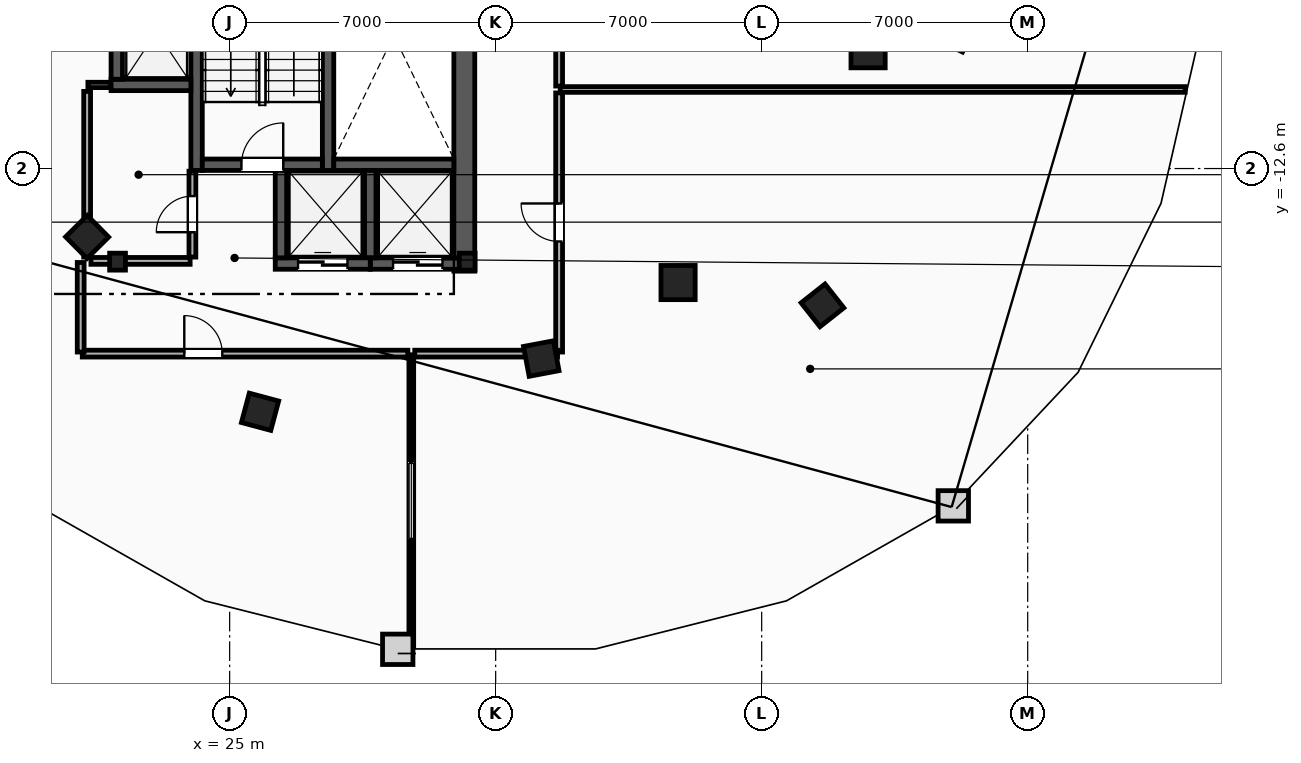
"""IFC4 building model, lengths in metres.
Left out: names, types, materials, properties, quantities, classifications, styles, units other than length and angle.
Written with IfcOpenShell. Run it as: python <this file> out.ifc"""

import sys

from ifc_helpers import new_model, si_unit, direction, frame, frame_2d, origin, origin_2d, place, context, subcontext, project, spatial, rectangle, i_section, extrude, element, fill, save


model = new_model("IFC4")
c1 = context("Model", 3, precision=1e-05, world=origin(), true_north=direction((0.0, 1.0)))
c2 = subcontext(c1, "Body", "Model", "MODEL_VIEW")
j1 = project(units=[si_unit("LENGTHUNIT", "METRE"), si_unit("PLANEANGLEUNIT", "RADIAN")], contexts=[c1])
p1 = place(None, origin())
s1 = spatial("IfcSite", under=j1, at=p1, CompositionType="ELEMENT")
p2 = place(p1, origin())
s2 = spatial("IfcBuilding", under=s1, at=p2, CompositionType="ELEMENT")
p3 = place(p2, frame((0.0, 0.0, 257.6)))
s3 = spatial("IfcBuildingStorey", under=s2, at=p3, CompositionType="ELEMENT", Elevation=257.6)
for number, where, z_axis, x_axis in (
    (1, (22.05, -15.05, 0.0), (0.0, 0.0, 1.0), (1.0, 0.0, 0.0)),
    (2, (31.25, -15.05, 0.0), (0.0, 0.0, 1.0), (1.0, 0.0, 0.0)),
):
    element("IfcColumn", number, at=place(p3, frame(where, z_axis=z_axis, x_axis=x_axis)), inside=s3, PredefinedType="COLUMN", context=c2, shape_type="SweptSolid", body=[
        extrude(i_section(OverallWidth=0.416, OverallDepth=0.446, WebThickness=0.039, FlangeThickness=0.063, FilletRadius=0.018, at=origin_2d()), origin(), (0.0, 0.0, 1.0), 3.6),
    ])
for number, where, z_axis, x_axis in (
    (3, (41.8, -9.5, 0.0), (0.0, 0.0, 1.0), (1.0, 0.0, 0.0)),
    (4, (36.8, -15.6, 0.0), (0.0, 0.0, 1.0), (1.0, 0.0, 0.0)),
):
    element("IfcColumn", number, at=place(p3, frame(where, z_axis=z_axis, x_axis=x_axis)), inside=s3, PredefinedType="COLUMN", context=c2, shape_type="SweptSolid", body=[
        extrude(rectangle(XDim=0.9, YDim=0.9, at=origin_2d()), origin(), (0.0, 0.0, 1.0), 3.6),
    ])
for number, where, z_axis, x_axis in (
    (5, (21.25, -14.4, 0.0), (0.0, 0.0, 1.0), (0.703, -0.711, 0.0)),
    (6, (25.8, -19.0, 0.0), (0.0, 0.0, 1.0), (0.966, -0.259, 0.0)),
    (7, (33.2, -17.6, 0.0), (0.0, 0.0, 1.0), (0.983, 0.186, 0.0)),
    (8, (40.6, -16.2, 0.0), (0.0, 0.0, 1.0), (0.785, 0.619, 0.0)),
):
    element("IfcColumn", number, at=place(p3, frame(where, z_axis=z_axis, x_axis=x_axis)), inside=s3, PredefinedType="COLUMN", context=c2, shape_type="SweptSolid", body=[
        extrude(rectangle(XDim=0.8, YDim=0.8, at=origin_2d()), origin(), (0.0, 0.0, 1.0), 3.6),
    ])
p4 = place(p3, frame((31.175, -15.3, 0.0), z_axis=(0.0, 0.0, 1.0), x_axis=(0.0, 1.0, 0.0)))
e9 = element("IfcWall", 9, at=p4, inside=s3, PredefinedType="SHEAR", context=c2, shape_type="SweptSolid", body=[
    extrude(rectangle(XDim=13.33, YDim=0.55, at=frame_2d((6.665, 0.0))), origin(), (0.0, 0.0, 1.0), 3.34),
])
for number, where, z_axis, x_axis in (
    (10, (27.59, -12.65, 0.0), (0.0, 0.0, 1.0), (0.0, 1.0, 0.0)),
    (11, (24.13, -12.65, 0.0), (0.0, 0.0, 1.0), (0.0, 1.0, 0.0)),
):
    element("IfcWall", number, at=place(p3, frame(where, z_axis=z_axis, x_axis=x_axis)), inside=s3, PredefinedType="SHEAR", context=c2, shape_type="SweptSolid", body=[
        extrude(rectangle(XDim=10.68, YDim=0.3, at=frame_2d((5.34, 0.0))), origin(), (0.0, 0.0, 1.0), 3.34),
    ])
p5 = place(p3, frame((27.74, -12.5, 0.0), z_axis=(0.0, 0.0, 1.0), x_axis=(1.0, 0.0, 0.0)))
e12 = element("IfcWall", 12, at=p5, inside=s3, PredefinedType="SHEAR", context=c2, shape_type="SweptSolid", body=[
    extrude(rectangle(XDim=3.16, YDim=0.3, at=frame_2d((1.58, 0.0))), origin(), (0.0, 0.0, 1.0), 3.34),
])
p6 = place(p3, frame((24.28, -12.5, 0.0), z_axis=(0.0, 0.0, 1.0), x_axis=(1.0, 0.0, 0.0)))
e13 = element("IfcWall", 13, at=p6, inside=s3, PredefinedType="SHEAR", context=c2, shape_type="SweptSolid", body=[
    extrude(rectangle(XDim=3.16, YDim=0.3, at=frame_2d((1.58, 0.0))), origin(), (0.0, 0.0, 1.0), 3.34),
])
p7 = place(p6, frame((1.03, 0.0, 0.0)))
e14 = element("IfcOpeningElement", 14, at=p7, cuts=e13, PredefinedType="OPENING", context=c2, shape_type="SweptSolid", body=[
    extrude(rectangle(XDim=1.1, YDim=2.15, at=frame_2d((0.55, 1.075))), frame((0.0, 0.16, 0.0), z_axis=(0.0, -1.0, 0.0), x_axis=(1.0, 0.0, 0.0)), (0.0, 0.0, 1.0), 0.32),
])
p8 = place(p3, frame((21.88, -10.4, 0.0), z_axis=(0.0, 0.0, 1.0), x_axis=(1.0, 0.0, 0.0)))
e15 = element("IfcWall", 15, at=p8, inside=s3, PredefinedType="SHEAR", context=c2, shape_type="SweptSolid", body=[
    extrude(rectangle(XDim=2.1, YDim=0.3, at=frame_2d((1.05, 0.0))), origin(), (0.0, 0.0, 1.0), 3.34),
])
p9 = place(p3, frame((22.03, -10.25, 0.0), z_axis=(0.0, 0.0, 1.0), x_axis=(0.0, 1.0, 0.0)))
e16 = element("IfcWall", 16, at=p9, inside=s3, PredefinedType="SHEAR", context=c2, shape_type="SweptSolid", body=[
    extrude(rectangle(XDim=2.5, YDim=0.3, at=frame_2d((1.25, 0.0))), origin(), (0.0, 0.0, 1.0), 3.34),
])
p10 = place(p3, frame((28.7, -15.1, 0.0), z_axis=(0.0, 0.0, 1.0), x_axis=(1.0, 0.0, 0.0)))
e17 = element("IfcWall", 17, at=p10, inside=s3, PredefinedType="SHEAR", context=c2, shape_type="SweptSolid", body=[
    extrude(rectangle(XDim=2.5, YDim=0.3, at=frame_2d((1.25, 0.0))), origin(), (0.0, 0.0, 1.0), 3.34),
])
p11 = place(p10, frame((0.6, 0.0, 0.0)))
e18 = element("IfcOpeningElement", 18, at=p11, cuts=e17, PredefinedType="OPENING", context=c2, shape_type="SweptSolid", body=[
    extrude(rectangle(XDim=1.3, YDim=2.2, at=frame_2d((0.65, 1.1))), frame((0.0, 0.16, 0.0), z_axis=(0.0, -1.0, 0.0), x_axis=(1.0, 0.0, 0.0)), (0.0, 0.0, 1.0), 0.32),
])
p12 = place(p3, frame((28.7, -14.95, 0.0), z_axis=(0.0, 0.0, 1.0), x_axis=(0.0, 1.0, 0.0)))
e19 = element("IfcWall", 19, at=p12, inside=s3, PredefinedType="SHEAR", context=c2, shape_type="SweptSolid", body=[
    extrude(rectangle(XDim=2.3, YDim=0.3, at=frame_2d((1.15, 0.0))), origin(), (0.0, 0.0, 1.0), 3.34),
])
p13 = place(p3, frame((26.2, -15.1, 0.0), z_axis=(0.0, 0.0, 1.0), x_axis=(1.0, 0.0, 0.0)))
e20 = element("IfcWall", 20, at=p13, inside=s3, PredefinedType="SHEAR", context=c2, shape_type="SweptSolid", body=[
    extrude(rectangle(XDim=2.5, YDim=0.3, at=frame_2d((1.25, 0.0))), origin(), (0.0, 0.0, 1.0), 3.34),
])
p14 = place(p13, frame((0.6, 0.0, 0.0)))
e21 = element("IfcOpeningElement", 21, at=p14, cuts=e20, PredefinedType="OPENING", context=c2, shape_type="SweptSolid", body=[
    extrude(rectangle(XDim=1.3, YDim=2.2, at=frame_2d((0.65, 1.1))), frame((0.0, 0.16, 0.0), z_axis=(0.0, -1.0, 0.0), x_axis=(1.0, 0.0, 0.0)), (0.0, 0.0, 1.0), 0.32),
])
p15 = place(p3, frame((26.35, -14.95, 0.0), z_axis=(0.0, 0.0, 1.0), x_axis=(0.0, 1.0, 0.0)))
e22 = element("IfcWall", 22, at=p15, inside=s3, PredefinedType="SHEAR", context=c2, shape_type="SweptSolid", body=[
    extrude(rectangle(XDim=2.3, YDim=0.3, at=frame_2d((1.15, 0.0))), origin(), (0.0, 0.0, 1.0), 3.34),
])
p16 = place(p3, frame((21.27, -10.4, 0.0), z_axis=(0.0, 0.0, 1.0), x_axis=(1.0, 0.0, 0.0)))
e23 = element("IfcWall", 23, at=p16, inside=s3, PredefinedType="PARTITIONING", context=c2, shape_type="SweptSolid", body=[
    extrude(rectangle(XDim=0.59, YDim=0.14, at=frame_2d((0.295, 0.0))), origin(), (0.0, 0.0, 1.0), 3.34),
])
p17 = place(p3, frame((21.25, -14.93, 0.0), z_axis=(0.0, 0.0, 1.0), x_axis=(0.0, 1.0, 0.0)))
e24 = element("IfcWall", 24, at=p17, inside=s3, PredefinedType="PARTITIONING", context=c2, shape_type="SweptSolid", body=[
    extrude(rectangle(XDim=4.36, YDim=0.18, at=frame_2d((2.18, 0.0))), origin(), (0.0, 0.0, 1.0), 3.34),
])
p18 = place(p3, frame((21.35, -15.03, 0.0), z_axis=(0.0, 0.0, 1.0), x_axis=(1.0, 0.0, 0.0)))
e25 = element("IfcWall", 25, at=p18, inside=s3, PredefinedType="PARTITIONING", context=c2, shape_type="SweptSolid", body=[
    extrude(rectangle(XDim=2.61, YDim=0.18, at=frame_2d((1.305, 0.0))), origin(), (0.0, 0.0, 1.0), 2.413),
])
p19 = place(p3, frame((24.02, -14.93, 0.0), z_axis=(0.0, 0.0, 1.0), x_axis=(0.0, 1.0, 0.0)))
e26 = element("IfcWall", 26, at=p19, inside=s3, PredefinedType="PARTITIONING", context=c2, shape_type="SweptSolid", body=[
    extrude(rectangle(XDim=2.26, YDim=0.18, at=frame_2d((1.13, 0.0))), origin(), (0.0, 0.0, 1.0), 3.34),
])
p20 = place(p19, frame((0.655, 0.0, 0.0)))
e27 = element("IfcOpeningElement", 27, at=p20, cuts=e26, PredefinedType="OPENING", context=c2, shape_type="SweptSolid", body=[
    extrude(rectangle(XDim=0.95, YDim=2.1, at=frame_2d((0.475, 1.05))), frame((0.0, 0.1, 0.0), z_axis=(0.0, -1.0, 0.0), x_axis=(1.0, 0.0, 0.0)), (0.0, 0.0, 1.0), 0.2),
])
p21 = place(p3, frame((33.7, -10.52, 0.0), z_axis=(0.0, 0.0, 1.0), x_axis=(1.0, 0.0, 0.0)))
e28 = element("IfcWall", 28, at=p21, inside=s3, PredefinedType="PARTITIONING", context=c2, shape_type="SweptSolid", body=[
    extrude(rectangle(XDim=16.444, YDim=0.15, at=frame_2d((8.222, 0.0))), origin(), (0.0, 0.0, 1.0), 3.34),
])
p22 = place(p3, frame((29.78, -25.19, 0.0), z_axis=(0.0, 0.0, 1.0), x_axis=(0.0, 1.0, 0.0)))
e29 = element("IfcWall", 29, at=p22, inside=s3, PredefinedType="PARTITIONING", context=c2, shape_type="SweptSolid", body=[
    extrude(rectangle(XDim=7.69, YDim=0.125, at=frame_2d((3.845, 0.0))), origin(), (0.0, 0.0, 1.0), 3.34),
])
p23 = place(p22, frame((2.845, 0.0, 1.05)))
e30 = element("IfcOpeningElement", 30, at=p23, cuts=e29, PredefinedType="OPENING", context=c2, shape_type="SweptSolid", body=[
    extrude(rectangle(XDim=2.0, YDim=1.5, at=frame_2d((1.0, 0.75))), frame((0.0, 0.073, 0.0), z_axis=(0.0, -1.0, 0.0), x_axis=(1.0, 0.0, 0.0)), (0.0, 0.0, 1.0), 0.145),
])
p24 = place(p3, frame((33.67, -17.428, 0.0), z_axis=(0.0, 0.0, 1.0), x_axis=(0.0, 1.0, 0.0)))
e31 = element("IfcWall", 31, at=p24, inside=s3, PredefinedType="PARTITIONING", context=c2, shape_type="SweptSolid", body=[
    extrude(rectangle(XDim=6.818, YDim=0.18, at=frame_2d((3.409, 0.0))), origin(), (0.0, 0.0, 1.0), 3.34),
])
p25 = place(p24, frame((2.909, 0.0, 0.0)))
e32 = element("IfcOpeningElement", 32, at=p25, cuts=e31, PredefinedType="OPENING", context=c2, shape_type="SweptSolid", body=[
    extrude(rectangle(XDim=1.0, YDim=2.15, at=frame_2d((0.5, 1.075))), frame((0.0, 0.1, 0.0), z_axis=(0.0, -1.0, 0.0), x_axis=(1.0, 0.0, 0.0)), (0.0, 0.0, 1.0), 0.2),
])
p26 = place(p3, frame((29.87, -17.47, 0.0), z_axis=(0.0, 0.0, 1.0), x_axis=(1.0, 0.0, 0.0)))
e33 = element("IfcWall", 33, at=p26, inside=s3, PredefinedType="PARTITIONING", context=c2, shape_type="SweptSolid", body=[
    extrude(rectangle(XDim=3.758, YDim=0.18, at=frame_2d((1.879, 0.0))), origin(), (0.0, 0.0, 1.0), 3.34),
])
p27 = place(p3, frame((21.122, -17.47, 0.0), z_axis=(0.0, 0.0, 1.0), x_axis=(1.0, 0.0, 0.0)))
e34 = element("IfcWall", 34, at=p27, inside=s3, PredefinedType="PARTITIONING", context=c2, shape_type="SweptSolid", body=[
    extrude(rectangle(XDim=8.568, YDim=0.18, at=frame_2d((4.284, 0.0))), origin(), (0.0, 0.0, 1.0), 3.34),
])
p28 = place(p27, frame((2.685, 0.0, 0.0)))
e35 = element("IfcOpeningElement", 35, at=p28, cuts=e34, PredefinedType="OPENING", context=c2, shape_type="SweptSolid", body=[
    extrude(rectangle(XDim=1.0, YDim=2.15, at=frame_2d((0.5, 1.075))), frame((0.0, 0.1, 0.0), z_axis=(0.0, -1.0, 0.0), x_axis=(1.0, 0.0, 0.0)), (0.0, 0.0, 1.0), 0.2),
])
p29 = place(p3, frame((21.08, -15.072, 0.0), z_axis=(0.0, 0.0, 1.0), x_axis=(0.0, -1.0, 0.0)))
e36 = element("IfcWall", 36, at=p29, inside=s3, PredefinedType="PARTITIONING", context=c2, shape_type="SweptSolid", body=[
    extrude(rectangle(XDim=2.357, YDim=0.18, at=frame_2d((1.178, 0.0))), origin(), (0.0, 0.0, 1.0), 3.34),
])
p30 = place(p3, frame((33.67, -10.43, 0.0), z_axis=(0.0, 0.0, 1.0), x_axis=(0.0, 1.0, 0.0)))
e37 = element("IfcWall", 37, at=p30, inside=s3, PredefinedType="PARTITIONING", context=c2, shape_type="SweptSolid", body=[
    extrude(rectangle(XDim=1.428, YDim=0.18, at=frame_2d((0.714, 0.0))), origin(), (0.0, 0.0, 1.0), 3.34),
])
p31 = place(p7, origin())
e38 = element("IfcDoor", 38, at=p31, inside=s3, OperationType="SINGLE_SWING_RIGHT", PredefinedType="DOOR", context=c2, shape_type="SweptSolid", body=[
    extrude(rectangle(XDim=1.1, YDim=2.15, at=frame_2d((0.55, 1.075))), frame((0.0, 0.025, 0.0), z_axis=(0.0, -1.0, 0.0), x_axis=(1.0, 0.0, 0.0)), (0.0, 0.0, 1.0), 0.05),
])
fill(e14, e38)
p32 = place(p11, origin())
e39 = element("IfcDoor", 39, at=p32, inside=s3, OperationType="SLIDING_TO_LEFT", PredefinedType="TRAPDOOR", context=c2, shape_type="SweptSolid", body=[
    extrude(rectangle(XDim=1.3, YDim=2.2, at=frame_2d((0.65, 1.1))), frame((0.0, 0.025, 0.0), z_axis=(0.0, -1.0, 0.0), x_axis=(1.0, 0.0, 0.0)), (0.0, 0.0, 1.0), 0.05),
])
fill(e18, e39)
p33 = place(p14, origin())
e40 = element("IfcDoor", 40, at=p33, inside=s3, OperationType="SLIDING_TO_LEFT", PredefinedType="TRAPDOOR", context=c2, shape_type="SweptSolid", body=[
    extrude(rectangle(XDim=1.3, YDim=2.2, at=frame_2d((0.65, 1.1))), frame((0.0, 0.025, 0.0), z_axis=(0.0, -1.0, 0.0), x_axis=(1.0, 0.0, 0.0)), (0.0, 0.0, 1.0), 0.05),
])
fill(e21, e40)
p34 = place(p28, origin())
e41 = element("IfcDoor", 41, at=p34, inside=s3, OperationType="SINGLE_SWING_LEFT", PredefinedType="DOOR", context=c2, shape_type="SweptSolid", body=[
    extrude(rectangle(XDim=1.0, YDim=2.15, at=frame_2d((0.5, 1.075))), frame((0.0, 0.025, 0.0), z_axis=(0.0, -1.0, 0.0), x_axis=(1.0, 0.0, 0.0)), (0.0, 0.0, 1.0), 0.05),
])
fill(e35, e41)
p35 = place(p25, origin())
e42 = element("IfcDoor", 42, at=p35, inside=s3, OperationType="SINGLE_SWING_RIGHT", PredefinedType="DOOR", context=c2, shape_type="SweptSolid", body=[
    extrude(rectangle(XDim=1.0, YDim=2.15, at=frame_2d((0.5, 1.075))), frame((0.0, 0.025, 0.0), z_axis=(0.0, -1.0, 0.0), x_axis=(1.0, 0.0, 0.0)), (0.0, 0.0, 1.0), 0.05),
])
fill(e32, e42)
p36 = place(p20, origin())
e43 = element("IfcDoor", 43, at=p36, inside=s3, OperationType="SINGLE_SWING_LEFT", PredefinedType="DOOR", context=c2, shape_type="SweptSolid", body=[
    extrude(rectangle(XDim=0.95, YDim=2.1, at=frame_2d((0.475, 1.05))), frame((0.0, 0.025, 0.0), z_axis=(0.0, -1.0, 0.0), x_axis=(1.0, 0.0, 0.0)), (0.0, 0.0, 1.0), 0.05),
])
fill(e27, e43)
p37 = place(p23, origin())
e44 = element("IfcWindow", 44, at=p37, inside=s3, PartitioningType="SINGLE_PANEL", PredefinedType="WINDOW", context=c2, shape_type="SweptSolid", body=[
    extrude(rectangle(XDim=2.0, YDim=1.5, at=frame_2d((1.0, 0.75))), frame((0.0, 0.03, 0.0), z_axis=(0.0, -1.0, 0.0), x_axis=(1.0, 0.0, 0.0)), (0.0, 0.0, 1.0), 0.06),
])
fill(e30, e44)
save(model, sys.argv[1])
